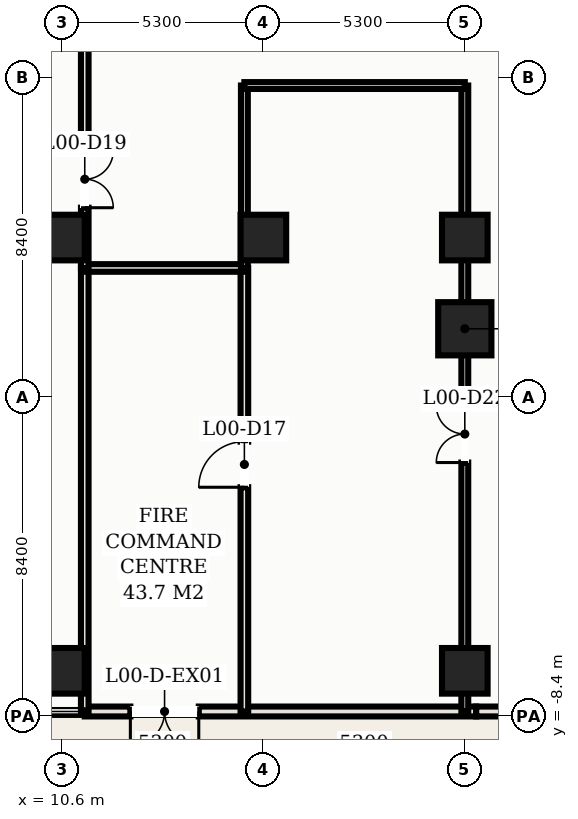
"""IFC4 building model, lengths in metres.
Left out: names, types, materials, properties, quantities, classifications, styles, units other than length and angle.
Written with IfcOpenShell. Run it as: python <this file> out.ifc"""

import sys

from ifc_helpers import new_model, si_unit, direction, frame, frame_2d, origin, origin_2d, place, context, subcontext, project, spatial, rectangle, hollow_rectangle, extrude, element, fill, save


model = new_model("IFC4")
c1 = context("Model", 3, precision=1e-05, world=origin(), true_north=direction((0.0, 1.0)))
c2 = subcontext(c1, "Body", "Model", "MODEL_VIEW")
j1 = project(units=[si_unit("LENGTHUNIT", "METRE"), si_unit("PLANEANGLEUNIT", "RADIAN")], contexts=[c1])
p1 = place(None, origin())
s1 = spatial("IfcSite", under=j1, at=p1, CompositionType="ELEMENT")
p2 = place(p1, origin())
s2 = spatial("IfcBuilding", under=s1, at=p2, CompositionType="ELEMENT")
p3 = place(p2, origin())
s3 = spatial("IfcBuildingStorey", under=s2, at=p3, CompositionType="ELEMENT", Elevation=0.0)
p4 = place(p3, frame((21.2, 1.8, 0.0), z_axis=(0.0, 0.0, 1.0), x_axis=(1.0, 0.0, 0.0)))
e1 = element("IfcColumn", 1, at=p4, inside=s3, PredefinedType="COLUMN", context=c2, shape_type="SweptSolid", body=[
    extrude(hollow_rectangle(XDim=1.4, YDim=1.4, WallThickness=0.045, at=origin_2d()), origin(), (0.0, 0.0, 1.0), 5.2),
])
for number, where, z_axis, x_axis in (
    (2, (10.6, 4.2, 0.0), (0.0, 0.0, 1.0), (1.0, 0.0, 0.0)),
    (3, (15.9, 4.2, 0.0), (0.0, 0.0, 1.0), (1.0, 0.0, 0.0)),
    (4, (21.2, 4.2, 0.0), (0.0, 0.0, 1.0), (1.0, 0.0, 0.0)),
    (5, (10.6, -7.2, 0.0), (0.0, 0.0, 1.0), (1.0, 0.0, 0.0)),
    (6, (21.2, -7.2, 0.0), (0.0, 0.0, 1.0), (1.0, 0.0, 0.0)),
):
    element("IfcColumn", number, at=place(p3, frame(where, z_axis=z_axis, x_axis=x_axis)), inside=s3, PredefinedType="COLUMN", context=c2, shape_type="SweptSolid", body=[
        extrude(hollow_rectangle(XDim=1.2, YDim=1.2, WallThickness=0.04, at=origin_2d()), origin(), (0.0, 0.0, 1.0), 5.2),
    ])
p5 = place(p3, frame((11.2, -8.27, 0.0), z_axis=(0.0, 0.0, 1.0), x_axis=(1.0, 0.0, 0.0)))
e7 = element("IfcWall", 7, at=p5, inside=s3, PredefinedType="SOLIDWALL", context=c2, shape_type="SweptSolid", body=[
    extrude(rectangle(XDim=10.3, YDim=0.26, at=frame_2d((5.15, 0.0))), origin(), (0.0, 0.0, 1.0), 4.95),
])
p6 = place(p5, frame((1.2, 0.0, 0.0)))
e8 = element("IfcOpeningElement", 8, at=p6, cuts=e7, PredefinedType="OPENING", context=c2, shape_type="SweptSolid", body=[
    extrude(rectangle(XDim=1.8, YDim=2.4, at=frame_2d((0.9, 1.2))), frame((0.0, 0.14, 0.0), z_axis=(0.0, -1.0, 0.0), x_axis=(1.0, 0.0, 0.0)), (0.0, 0.0, 1.0), 0.28),
])
p7 = place(p3, frame((21.5, -8.27, 0.0), z_axis=(0.0, 0.0, 1.0), x_axis=(1.0, 0.0, 0.0)))
e9 = element("IfcWall", 9, at=p7, inside=s3, PredefinedType="SOLIDWALL", context=c2, shape_type="SweptSolid", body=[
    extrude(rectangle(XDim=10.0, YDim=0.26, at=frame_2d((5.0, 0.0))), origin(), (0.0, 0.0, 1.0), 4.95),
])
p8 = place(p7, frame((1.8, 0.0, 0.0)))
e10 = element("IfcOpeningElement", 10, at=p8, cuts=e9, PredefinedType="OPENING", context=c2, shape_type="SweptSolid", body=[
    extrude(rectangle(XDim=2.2, YDim=2.6, at=frame_2d((1.1, 1.3))), frame((0.0, 0.14, 0.0), z_axis=(0.0, -1.0, 0.0), x_axis=(1.0, 0.0, 0.0)), (0.0, 0.0, 1.0), 0.28),
])
p9 = place(p7, frame((6.0, 0.0, 0.0)))
e11 = element("IfcOpeningElement", 11, at=p9, cuts=e9, PredefinedType="OPENING", context=c2, shape_type="SweptSolid", body=[
    extrude(rectangle(XDim=2.2, YDim=2.6, at=frame_2d((1.1, 1.3))), frame((0.0, 0.14, 0.0), z_axis=(0.0, -1.0, 0.0), x_axis=(1.0, 0.0, 0.0)), (0.0, 0.0, 1.0), 0.28),
])
p10 = place(p3, frame((11.2, -8.27, 0.0), z_axis=(0.0, 0.0, 1.0), x_axis=(0.0, 1.0, 0.0)))
e12 = element("IfcWall", 12, at=p10, inside=s3, PredefinedType="PARTITIONING", context=c2, shape_type="SweptSolid", body=[
    extrude(rectangle(XDim=11.67, YDim=0.2, at=frame_2d((5.835, 0.0))), origin(), (0.0, 0.0, 1.0), 4.95),
])
p11 = place(p3, frame((15.4, -8.27, 0.0), z_axis=(0.0, 0.0, 1.0), x_axis=(0.0, 1.0, 0.0)))
e13 = element("IfcWall", 13, at=p11, inside=s3, PredefinedType="PARTITIONING", context=c2, shape_type="SweptSolid", body=[
    extrude(rectangle(XDim=11.67, YDim=0.2, at=frame_2d((5.835, 0.0))), origin(), (0.0, 0.0, 1.0), 4.95),
])
p12 = place(p11, frame((5.9, 0.0, 0.0)))
e14 = element("IfcOpeningElement", 14, at=p12, cuts=e13, PredefinedType="OPENING", context=c2, shape_type="SweptSolid", body=[
    extrude(rectangle(XDim=1.2, YDim=2.2, at=frame_2d((0.6, 1.1))), frame((0.0, 0.11, 0.0), z_axis=(0.0, -1.0, 0.0), x_axis=(1.0, 0.0, 0.0)), (0.0, 0.0, 1.0), 0.22),
])
p13 = place(p3, frame((11.2, 3.4, 0.0), z_axis=(0.0, 0.0, 1.0), x_axis=(1.0, 0.0, 0.0)))
e15 = element("IfcWall", 15, at=p13, inside=s3, PredefinedType="PARTITIONING", context=c2, shape_type="SweptSolid", body=[
    extrude(rectangle(XDim=4.2, YDim=0.2, at=frame_2d((2.1, 0.0))), origin(), (0.0, 0.0, 1.0), 4.95),
])
p14 = place(p3, frame((-10.47, 6.8, 0.0), z_axis=(0.0, 0.0, 1.0), x_axis=(1.0, 0.0, 0.0)))
e16 = element("IfcWall", 16, at=p14, inside=s3, PredefinedType="PARTITIONING", context=c2, shape_type="SweptSolid", body=[
    extrude(rectangle(XDim=21.67, YDim=0.2, at=frame_2d((10.835, 0.0))), origin(), (0.0, 0.0, 1.0), 4.95),
])
p15 = place(p14, frame((15.75, 0.0, 0.0)))
e17 = element("IfcOpeningElement", 17, at=p15, cuts=e16, PredefinedType="OPENING", context=c2, shape_type="SweptSolid", body=[
    extrude(rectangle(XDim=1.5, YDim=2.25, at=frame_2d((0.75, 1.125))), frame((0.0, 0.11, 0.0), z_axis=(0.0, -1.0, 0.0), x_axis=(1.0, 0.0, 0.0)), (0.0, 0.0, 1.0), 0.22),
])
p16 = place(p3, frame((11.2, 3.4, 0.0), z_axis=(0.0, 0.0, 1.0), x_axis=(0.0, 1.0, 0.0)))
e18 = element("IfcWall", 18, at=p16, inside=s3, PredefinedType="PARTITIONING", context=c2, shape_type="SweptSolid", body=[
    extrude(rectangle(XDim=3.4, YDim=0.2, at=frame_2d((1.7, 0.0))), origin(), (0.0, 0.0, 1.0), 4.95),
])
p17 = place(p16, frame((1.585, 0.0, 0.0)))
e19 = element("IfcOpeningElement", 19, at=p17, cuts=e18, PredefinedType="OPENING", context=c2, shape_type="SweptSolid", body=[
    extrude(rectangle(XDim=1.5, YDim=2.25, at=frame_2d((0.75, 1.125))), frame((0.0, 0.11, 0.0), z_axis=(0.0, -1.0, 0.0), x_axis=(1.0, 0.0, 0.0)), (0.0, 0.0, 1.0), 0.22),
])
p18 = place(p3, frame((11.2, 6.8, 0.0), z_axis=(0.0, 0.0, 1.0), x_axis=(0.0, 1.0, 0.0)))
e20 = element("IfcWall", 20, at=p18, inside=s3, PredefinedType="PARTITIONING", context=c2, shape_type="SweptSolid", body=[
    extrude(rectangle(XDim=15.8, YDim=0.2, at=frame_2d((7.9, 0.0))), origin(), (0.0, 0.0, 1.0), 4.95),
])
p19 = place(p18, frame((5.45, 0.0, 0.0)))
e21 = element("IfcOpeningElement", 21, at=p19, cuts=e20, PredefinedType="OPENING", context=c2, shape_type="SweptSolid", body=[
    extrude(rectangle(XDim=1.5, YDim=2.25, at=frame_2d((0.75, 1.125))), frame((0.0, 0.11, 0.0), z_axis=(0.0, -1.0, 0.0), x_axis=(1.0, 0.0, 0.0)), (0.0, 0.0, 1.0), 0.22),
])
p20 = place(p3, frame((15.4, 3.4, 0.0), z_axis=(0.0, 0.0, 1.0), x_axis=(0.0, 1.0, 0.0)))
e22 = element("IfcWall", 22, at=p20, inside=s3, PredefinedType="PARTITIONING", context=c2, shape_type="SweptSolid", body=[
    extrude(rectangle(XDim=4.8, YDim=0.18, at=frame_2d((2.4, 0.0))), origin(), (0.0, 0.0, 1.0), 4.95),
])
p21 = place(p3, frame((21.2, -8.27, 0.0), z_axis=(0.0, 0.0, 1.0), x_axis=(0.0, 1.0, 0.0)))
e23 = element("IfcWall", 23, at=p21, inside=s3, PredefinedType="PARTITIONING", context=c2, shape_type="SweptSolid", body=[
    extrude(rectangle(XDim=16.47, YDim=0.18, at=frame_2d((8.235, 0.0))), origin(), (0.0, 0.0, 1.0), 4.095),
])
p22 = place(p21, frame((6.55, 0.0, 0.0)))
e24 = element("IfcOpeningElement", 24, at=p22, cuts=e23, PredefinedType="OPENING", context=c2, shape_type="SweptSolid", body=[
    extrude(rectangle(XDim=1.5, YDim=2.25, at=frame_2d((0.75, 1.125))), frame((0.0, 0.1, 0.0), z_axis=(0.0, -1.0, 0.0), x_axis=(1.0, 0.0, 0.0)), (0.0, 0.0, 1.0), 0.2),
])
p23 = place(p3, frame((15.4, 8.2, 0.0), z_axis=(0.0, 0.0, 1.0), x_axis=(1.0, 0.0, 0.0)))
e25 = element("IfcWall", 25, at=p23, inside=s3, PredefinedType="PARTITIONING", context=c2, shape_type="SweptSolid", body=[
    extrude(rectangle(XDim=5.8, YDim=0.18, at=frame_2d((2.9, 0.0))), origin(), (0.0, 0.0, 1.0), 4.95),
])
p24 = place(p6, frame((1.8, 0.0, 0.0), z_axis=(0.0, 0.0, 1.0), x_axis=(-1.0, 0.0, 0.0)))
e26 = element("IfcDoor", 26, at=p24, inside=s3, OperationType="DOUBLE_DOOR_SINGLE_SWING", PredefinedType="DOOR", context=c2, shape_type="SweptSolid", body=[
    extrude(rectangle(XDim=1.8, YDim=2.4, at=frame_2d((0.9, 1.2))), frame((0.0, 0.025, 0.0), z_axis=(0.0, -1.0, 0.0), x_axis=(1.0, 0.0, 0.0)), (0.0, 0.0, 1.0), 0.05),
])
fill(e8, e26)
p25 = place(p12, origin())
e27 = element("IfcDoor", 27, at=p25, inside=s3, OperationType="SINGLE_SWING_LEFT", PredefinedType="DOOR", context=c2, shape_type="SweptSolid", body=[
    extrude(rectangle(XDim=1.2, YDim=2.2, at=frame_2d((0.6, 1.1))), frame((0.0, 0.025, 0.0), z_axis=(0.0, -1.0, 0.0), x_axis=(1.0, 0.0, 0.0)), (0.0, 0.0, 1.0), 0.05),
])
fill(e14, e27)
p26 = place(p17, frame((1.5, 0.0, 0.0), z_axis=(0.0, 0.0, 1.0), x_axis=(-1.0, 0.0, 0.0)))
e28 = element("IfcDoor", 28, at=p26, inside=s3, OperationType="DOUBLE_DOOR_SINGLE_SWING", PredefinedType="DOOR", context=c2, shape_type="SweptSolid", body=[
    extrude(rectangle(XDim=1.5, YDim=2.25, at=frame_2d((0.75, 1.125))), frame((0.0, 0.025, 0.0), z_axis=(0.0, -1.0, 0.0), x_axis=(1.0, 0.0, 0.0)), (0.0, 0.0, 1.0), 0.05),
])
fill(e19, e28)
p27 = place(p22, origin())
e29 = element("IfcDoor", 29, at=p27, inside=s3, OperationType="DOUBLE_DOOR_SINGLE_SWING", PredefinedType="DOOR", context=c2, shape_type="SweptSolid", body=[
    extrude(rectangle(XDim=1.5, YDim=2.25, at=frame_2d((0.75, 1.125))), frame((0.0, 0.025, 0.0), z_axis=(0.0, -1.0, 0.0), x_axis=(1.0, 0.0, 0.0)), (0.0, 0.0, 1.0), 0.05),
])
fill(e24, e29)
save(model, sys.argv[1])
